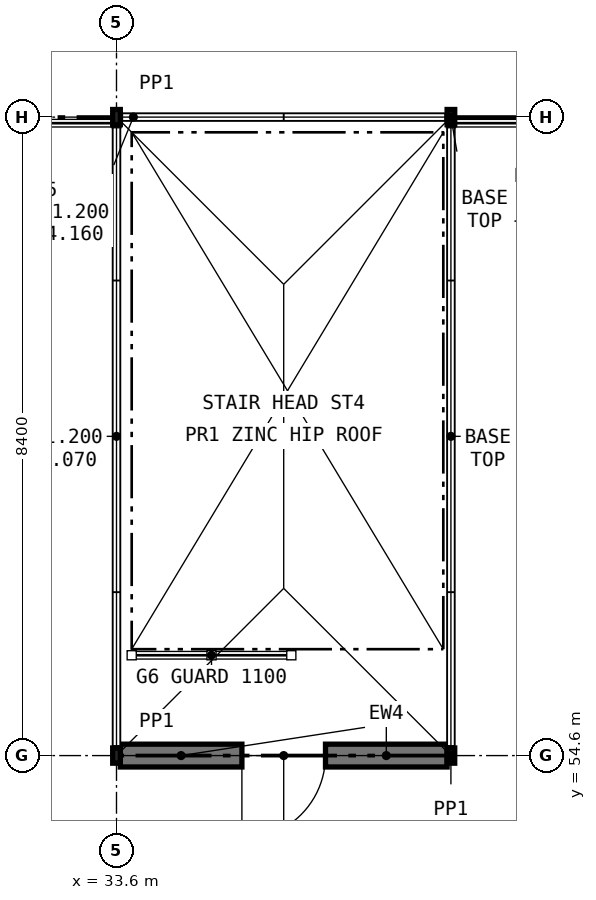
"""IFC4 building model, lengths in metres.
Left out: names, types, materials, properties, quantities, classifications, styles, units other than length and angle.
Written with IfcOpenShell. Run it as: python <this file> out.ifc"""

import sys

from ifc_helpers import new_model, si_unit, direction, frame, frame_2d, origin, origin_2d, place, context, subcontext, project, spatial, rectangle, hollow_rectangle, extrude, element, fill, save


model = new_model("IFC4")
c1 = context("Model", 3, precision=1e-05, world=origin(), true_north=direction((0.0, 1.0)))
c2 = subcontext(c1, "Body", "Model", "MODEL_VIEW")
j1 = project(units=[si_unit("LENGTHUNIT", "METRE"), si_unit("PLANEANGLEUNIT", "RADIAN")], contexts=[c1])
p1 = place(None, origin())
s1 = spatial("IfcSite", under=j1, at=p1, CompositionType="ELEMENT")
p2 = place(p1, origin())
s2 = spatial("IfcBuilding", under=s1, at=p2, CompositionType="ELEMENT")
p3 = place(p2, frame((0.0, 0.0, 31.2)))
s3 = spatial("IfcBuildingStorey", under=s2, at=p3, CompositionType="ELEMENT", Elevation=31.2)
p4 = place(p3, frame((33.6, 63.0, 0.0), z_axis=(0.0, 0.0, 1.0), x_axis=(1.0, 0.0, 0.0)))
e1 = element("IfcColumn", 1, at=p4, inside=s3, PredefinedType="COLUMN", context=c2, shape_type="SweptSolid", body=[
    extrude(hollow_rectangle(XDim=0.1, YDim=0.2, WallThickness=0.008, at=origin_2d()), origin(), (0.0, 0.0, 1.0), 3.2),
])
p5 = place(p3, frame((38.0, 63.0, -0.2), z_axis=(0.0, 0.0, 1.0), x_axis=(1.0, 0.0, 0.0)))
e2 = element("IfcColumn", 2, at=p5, inside=s3, PredefinedType="COLUMN", context=c2, shape_type="SweptSolid", body=[
    extrude(hollow_rectangle(XDim=0.1, YDim=0.2, WallThickness=0.008, at=origin_2d()), origin(), (0.0, 0.0, 1.0), 3.4),
])
p6 = place(p3, frame((33.6, 54.6, 0.0), z_axis=(0.0, 0.0, 1.0), x_axis=(1.0, 0.0, 0.0)))
e3 = element("IfcColumn", 3, at=p6, inside=s3, PredefinedType="COLUMN", context=c2, shape_type="SweptSolid", body=[
    extrude(hollow_rectangle(XDim=0.1, YDim=0.2, WallThickness=0.008, at=origin_2d()), origin(), (0.0, 0.0, 1.0), 3.2),
])
p7 = place(p3, frame((38.0, 54.6, -0.2), z_axis=(0.0, 0.0, 1.0), x_axis=(1.0, 0.0, 0.0)))
e4 = element("IfcColumn", 4, at=p7, inside=s3, PredefinedType="COLUMN", context=c2, shape_type="SweptSolid", body=[
    extrude(hollow_rectangle(XDim=0.1, YDim=0.2, WallThickness=0.008, at=origin_2d()), origin(), (0.0, 0.0, 1.0), 3.4),
])
p8 = place(p3, frame((33.65, 54.6, 0.0), z_axis=(0.0, 0.0, 1.0), x_axis=(1.0, 0.0, 0.0)))
e5 = element("IfcWall", 5, at=p8, inside=s3, PredefinedType="STANDARD", context=c2, shape_type="SweptSolid", body=[
    extrude(rectangle(XDim=4.3, YDim=0.3, at=frame_2d((2.15, 0.0))), origin(), (0.0, 0.0, 1.0), 3.2),
])
p9 = place(p8, frame((1.6, 0.0, 0.0)))
e6 = element("IfcOpeningElement", 6, at=p9, cuts=e5, PredefinedType="OPENING", context=c2, shape_type="SweptSolid", body=[
    extrude(rectangle(XDim=1.1, YDim=2.1, at=frame_2d((0.55, 1.05))), frame((0.0, 0.16, 0.0), z_axis=(0.0, -1.0, 0.0), x_axis=(1.0, 0.0, 0.0)), (0.0, 0.0, 1.0), 0.32),
])
p10 = place(p9, frame((1.1, 0.0, 0.0), z_axis=(0.0, 0.0, 1.0), x_axis=(-1.0, 0.0, 0.0)))
e7 = element("IfcDoor", 7, at=p10, inside=s3, OperationType="SINGLE_SWING_RIGHT", PredefinedType="DOOR", context=c2, shape_type="SweptSolid", body=[
    extrude(rectangle(XDim=1.1, YDim=2.1, at=frame_2d((0.55, 1.05))), frame((0.0, 0.025, 0.0), z_axis=(0.0, -1.0, 0.0), x_axis=(1.0, 0.0, 0.0)), (0.0, 0.0, 1.0), 0.05),
])
fill(e6, e7)
save(model, sys.argv[1])
